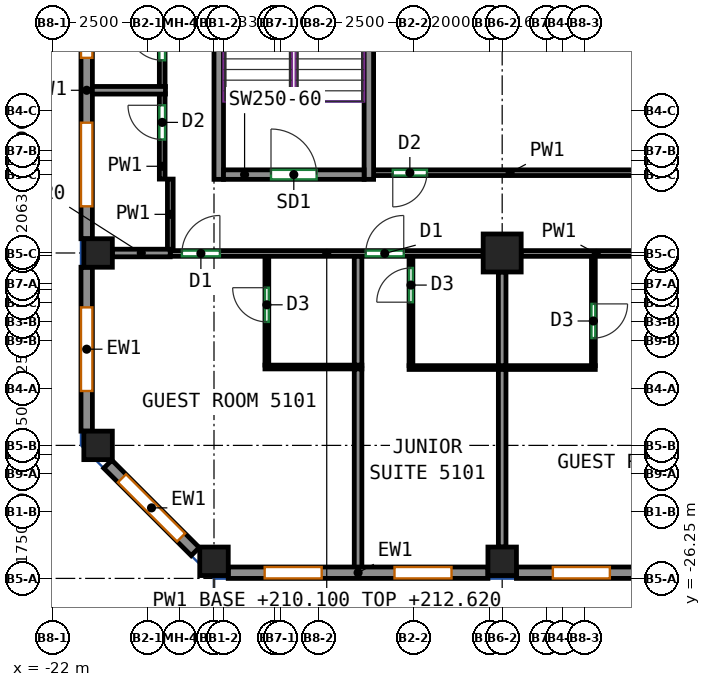
"""IFC4 building model, lengths in metres.
Left out: names, types, materials, properties, quantities, classifications, styles, units other than length and angle.
Written with IfcOpenShell. Run it as: python <this file> out.ifc"""

import sys

from ifc_helpers import new_model, si_unit, direction, frame, frame_2d, origin, origin_2d, place, context, subcontext, project, spatial, rectangle, extrude, source, transform, mapped, element, fill, save


model = new_model("IFC4")
c1 = context("Model", 3, precision=1e-05, world=origin(), true_north=direction((0.0, 1.0)))
c2 = subcontext(c1, "Body", "Model", "MODEL_VIEW")
j1 = project(units=[si_unit("LENGTHUNIT", "METRE"), si_unit("PLANEANGLEUNIT", "RADIAN")], contexts=[c1])
p1 = place(None, origin())
s1 = spatial("IfcSite", under=j1, at=p1, CompositionType="ELEMENT")
p2 = place(p1, origin())
s2 = spatial("IfcBuilding", under=s1, at=p2, CompositionType="ELEMENT")
p3 = place(p2, frame((0.0, 0.0, 210.1)))
s3 = spatial("IfcBuildingStorey", under=s2, at=p3, CompositionType="ELEMENT", Elevation=210.1)
m1 = source(origin(), c2, "Body", "SweptSolid", [
    extrude(rectangle(XDim=0.75, YDim=0.75, at=origin_2d()), origin(), (0.0, 0.0, 1.0), 3.12),
])
for number, where, z_axis, x_axis in (
    (1, (-20.8, -22.75, 0.0), (0.0, 0.0, 1.0), (1.0, 0.0, 0.0)),
    (2, (-20.8, -17.688, 0.0), (0.0, 0.0, 1.0), (1.0, 0.0, 0.0)),
    (3, (-17.75, -25.8, 0.0), (0.0, 0.0, 1.0), (1.0, 0.0, 0.0)),
    (4, (-10.167, -25.8, 0.0), (0.0, 0.0, 1.0), (1.0, 0.0, 0.0)),
):
    element("IfcColumn", number, at=place(p3, frame(where, z_axis=z_axis, x_axis=x_axis)), inside=s3, PredefinedType="COLUMN", context=c2, shape_type="MappedRepresentation", body=[
        mapped(m1, transform((0.0, 0.0, 0.0))),
    ])
m2 = source(origin(), c2, "Body", "SweptSolid", [
    extrude(rectangle(XDim=1.0, YDim=1.0, at=origin_2d()), origin(), (0.0, 0.0, 1.0), 3.12),
])
p4 = place(p3, frame((-10.167, -17.688, 0.0), z_axis=(0.0, 0.0, 1.0), x_axis=(1.0, 0.0, 0.0)))
e5 = element("IfcColumn", 5, at=p4, inside=s3, PredefinedType="COLUMN", context=c2, shape_type="MappedRepresentation", body=[
    mapped(m2, transform((0.0, 0.0, 0.0))),
])
m3 = source(origin(), c2, "Body", "SweptSolid", [
    extrude(rectangle(XDim=8.0, YDim=0.25, at=frame_2d((4.0, 0.0))), origin(), (0.0, 0.0, 1.0), 3.12),
])
for number, where, z_axis, x_axis in (
    (6, (-17.625, -15.75, 0.0), (0.0, 0.0, 1.0), (0.0, 1.0, 0.0)),
    (7, (-13.675, -15.75, 0.0), (0.0, 0.0, 1.0), (0.0, 1.0, 0.0)),
):
    element("IfcWall", number, at=place(p3, frame(where, z_axis=z_axis, x_axis=x_axis)), inside=s3, PredefinedType="SHEAR", context=c2, shape_type="MappedRepresentation", body=[
        mapped(m3, transform((0.0, 0.0, 0.0))),
    ])
m4 = source(origin(), c2, "Body", "SweptSolid", [
    extrude(rectangle(XDim=3.7, YDim=0.25, at=frame_2d((1.85, 0.0))), origin(), (0.0, 0.0, 1.0), 3.12),
])
p5 = place(p3, frame((-17.5, -15.625, 0.0), z_axis=(0.0, 0.0, 1.0), x_axis=(1.0, 0.0, 0.0)))
e8 = element("IfcWall", 8, at=p5, inside=s3, PredefinedType="SHEAR", context=c2, shape_type="MappedRepresentation", body=[
    mapped(m4, transform((0.0, 0.0, 0.0))),
])
p6 = place(p5, frame((1.25, 0.0, 0.0)))
e9 = element("IfcOpeningElement", 9, at=p6, cuts=e8, PredefinedType="OPENING", context=c2, shape_type="SweptSolid", body=[
    extrude(rectangle(XDim=1.2, YDim=2.1, at=frame_2d((0.6, 1.05))), frame((0.0, 0.135, 0.0), z_axis=(0.0, -1.0, 0.0), x_axis=(1.0, 0.0, 0.0)), (0.0, 0.0, 1.0), 0.27),
])
m5 = source(origin(), c2, "Body", "SweptSolid", [
    extrude(rectangle(XDim=6.833, YDim=0.3, at=frame_2d((3.417, 0.0))), origin(), (0.0, 0.0, 1.0), 3.12),
])
p7 = place(p3, frame((-17.375, -26.1, 0.0), z_axis=(0.0, 0.0, 1.0), x_axis=(1.0, 0.0, 0.0)))
e10 = element("IfcWall", 10, at=p7, inside=s3, PredefinedType="SOLIDWALL", context=c2, shape_type="MappedRepresentation", body=[
    mapped(m5, transform((0.0, 0.0, 0.0))),
])
p8 = place(p7, frame((0.958, 0.0, 0.85)))
e11 = element("IfcOpeningElement", 11, at=p8, cuts=e10, PredefinedType="OPENING", context=c2, shape_type="SweptSolid", body=[
    extrude(rectangle(XDim=1.5, YDim=1.95, at=frame_2d((0.75, 0.975))), frame((0.0, 0.16, 0.0), z_axis=(0.0, -1.0, 0.0), x_axis=(1.0, 0.0, 0.0)), (0.0, 0.0, 1.0), 0.32),
])
p9 = place(p7, frame((4.375, 0.0, 0.85)))
e12 = element("IfcOpeningElement", 12, at=p9, cuts=e10, PredefinedType="OPENING", context=c2, shape_type="SweptSolid", body=[
    extrude(rectangle(XDim=1.5, YDim=1.95, at=frame_2d((0.75, 0.975))), frame((0.0, 0.16, 0.0), z_axis=(0.0, -1.0, 0.0), x_axis=(1.0, 0.0, 0.0)), (0.0, 0.0, 1.0), 0.32),
])
m6 = source(origin(), c2, "Body", "SweptSolid", [
    extrude(rectangle(XDim=6.833, YDim=0.3, at=frame_2d((3.417, 0.0))), origin(), (0.0, 0.0, 1.0), 3.12),
])
p10 = place(p3, frame((-9.792, -26.1, 0.0), z_axis=(0.0, 0.0, 1.0), x_axis=(1.0, 0.0, 0.0)))
e13 = element("IfcWall", 13, at=p10, inside=s3, PredefinedType="SOLIDWALL", context=c2, shape_type="MappedRepresentation", body=[
    mapped(m6, transform((0.0, 0.0, 0.0))),
])
p11 = place(p10, frame((0.958, 0.0, 0.85)))
e14 = element("IfcOpeningElement", 14, at=p11, cuts=e13, PredefinedType="OPENING", context=c2, shape_type="SweptSolid", body=[
    extrude(rectangle(XDim=1.5, YDim=1.95, at=frame_2d((0.75, 0.975))), frame((0.0, 0.16, 0.0), z_axis=(0.0, -1.0, 0.0), x_axis=(1.0, 0.0, 0.0)), (0.0, 0.0, 1.0), 0.32),
])
p12 = place(p10, frame((4.375, 0.0, 0.85)))
e15 = element("IfcOpeningElement", 15, at=p12, cuts=e13, PredefinedType="OPENING", context=c2, shape_type="SweptSolid", body=[
    extrude(rectangle(XDim=1.5, YDim=1.95, at=frame_2d((0.75, 0.975))), frame((0.0, 0.16, 0.0), z_axis=(0.0, -1.0, 0.0), x_axis=(1.0, 0.0, 0.0)), (0.0, 0.0, 1.0), 0.32),
])
m7 = source(origin(), c2, "Body", "SweptSolid", [
    extrude(rectangle(XDim=7.812, YDim=0.3, at=frame_2d((3.906, 0.0))), origin(), (0.0, 0.0, 1.0), 3.12),
])
p13 = place(p3, frame((-21.1, -9.5, 0.0), z_axis=(0.0, 0.0, 1.0), x_axis=(0.0, -1.0, 0.0)))
e16 = element("IfcWall", 16, at=p13, inside=s3, PredefinedType="SOLIDWALL", context=c2, shape_type="MappedRepresentation", body=[
    mapped(m7, transform((0.0, 0.0, 0.0))),
])
p14 = place(p13, frame((0.853, 0.0, 0.85)))
e17 = element("IfcOpeningElement", 17, at=p14, cuts=e16, PredefinedType="OPENING", context=c2, shape_type="SweptSolid", body=[
    extrude(rectangle(XDim=2.2, YDim=1.95, at=frame_2d((1.1, 0.975))), frame((0.0, 0.16, 0.0), z_axis=(0.0, -1.0, 0.0), x_axis=(1.0, 0.0, 0.0)), (0.0, 0.0, 1.0), 0.32),
])
p15 = place(p13, frame((4.759, 0.0, 0.85)))
e18 = element("IfcOpeningElement", 18, at=p15, cuts=e16, PredefinedType="OPENING", context=c2, shape_type="SweptSolid", body=[
    extrude(rectangle(XDim=2.2, YDim=1.95, at=frame_2d((1.1, 0.975))), frame((0.0, 0.16, 0.0), z_axis=(0.0, -1.0, 0.0), x_axis=(1.0, 0.0, 0.0)), (0.0, 0.0, 1.0), 0.32),
])
m8 = source(origin(), c2, "Body", "SweptSolid", [
    extrude(rectangle(XDim=4.312, YDim=0.3, at=frame_2d((2.156, 0.0))), origin(), (0.0, 0.0, 1.0), 3.12),
])
p16 = place(p3, frame((-21.1, -18.062, 0.0), z_axis=(0.0, 0.0, 1.0), x_axis=(0.0, -1.0, 0.0)))
e19 = element("IfcWall", 19, at=p16, inside=s3, PredefinedType="SOLIDWALL", context=c2, shape_type="MappedRepresentation", body=[
    mapped(m8, transform((0.0, 0.0, 0.0))),
])
p17 = place(p16, frame((1.056, 0.0, 0.85)))
e20 = element("IfcOpeningElement", 20, at=p17, cuts=e19, PredefinedType="OPENING", context=c2, shape_type="SweptSolid", body=[
    extrude(rectangle(XDim=2.2, YDim=1.95, at=frame_2d((1.1, 0.975))), frame((0.0, 0.16, 0.0), z_axis=(0.0, -1.0, 0.0), x_axis=(1.0, 0.0, 0.0)), (0.0, 0.0, 1.0), 0.32),
])
m9 = source(origin(), c2, "Body", "SweptSolid", [
    extrude(rectangle(XDim=3.253, YDim=0.3, at=frame_2d((1.626, 0.0))), origin(), (0.0, 0.0, 1.0), 3.12),
])
p18 = place(p3, frame((-20.544, -23.244, 0.0), z_axis=(0.0, 0.0, 1.0), x_axis=(0.707106781187, -0.707106781187, 0.0)))
e21 = element("IfcWall", 21, at=p18, inside=s3, PredefinedType="SOLIDWALL", context=c2, shape_type="MappedRepresentation", body=[
    mapped(m9, transform((0.0, 0.0, 0.0))),
])
p19 = place(p18, frame((0.526, 0.0, 0.85)))
e22 = element("IfcOpeningElement", 22, at=p19, cuts=e21, PredefinedType="OPENING", context=c2, shape_type="SweptSolid", body=[
    extrude(rectangle(XDim=2.2, YDim=1.95, at=frame_2d((1.1, 0.975))), frame((0.0, 0.16, 0.0), z_axis=(0.0, -1.0, 0.0), x_axis=(1.0, 0.0, 0.0)), (0.0, 0.0, 1.0), 0.32),
])
p20 = place(p3, frame((-18.9, -17.7, 0.0), z_axis=(0.0, 0.0, 1.0), x_axis=(1.0, 0.0, 0.0)))
e23 = element("IfcWall", 23, at=p20, inside=s3, PredefinedType="PARTITIONING", context=c2, shape_type="SweptSolid", body=[
    extrude(rectangle(XDim=8.233, YDim=0.15, at=frame_2d((4.116, 0.0))), origin(), (0.0, 0.0, 1.0), 2.52),
])
p21 = place(p20, frame((0.305, 0.0, 0.0)))
e24 = element("IfcOpeningElement", 24, at=p21, cuts=e23, PredefinedType="OPENING", context=c2, shape_type="SweptSolid", body=[
    extrude(rectangle(XDim=1.0, YDim=2.1, at=frame_2d((0.5, 1.05))), frame((0.0, 0.085, 0.0), z_axis=(0.0, -1.0, 0.0), x_axis=(1.0, 0.0, 0.0)), (0.0, 0.0, 1.0), 0.17),
])
p22 = place(p20, frame((5.143, 0.0, 0.0)))
e25 = element("IfcOpeningElement", 25, at=p22, cuts=e23, PredefinedType="OPENING", context=c2, shape_type="SweptSolid", body=[
    extrude(rectangle(XDim=1.0, YDim=2.1, at=frame_2d((0.5, 1.05))), frame((0.0, 0.085, 0.0), z_axis=(0.0, -1.0, 0.0), x_axis=(1.0, 0.0, 0.0)), (0.0, 0.0, 1.0), 0.17),
])
p23 = place(p3, frame((-9.667, -17.7, 0.0), z_axis=(0.0, 0.0, 1.0), x_axis=(1.0, 0.0, 0.0)))
e26 = element("IfcWall", 26, at=p23, inside=s3, PredefinedType="PARTITIONING", context=c2, shape_type="SweptSolid", body=[
    extrude(rectangle(XDim=6.584, YDim=0.15, at=frame_2d((3.292, 0.0))), origin(), (0.0, 0.0, 1.0), 3.12),
])
p24 = place(p23, frame((3.119, 0.0, 0.0)))
e27 = element("IfcOpeningElement", 27, at=p24, cuts=e26, PredefinedType="OPENING", context=c2, shape_type="SweptSolid", body=[
    extrude(rectangle(XDim=1.0, YDim=2.1, at=frame_2d((0.5, 1.05))), frame((0.0, 0.085, 0.0), z_axis=(0.0, -1.0, 0.0), x_axis=(1.0, 0.0, 0.0)), (0.0, 0.0, 1.0), 0.17),
])
p25 = place(p3, frame((-18.9, -17.598, 0.0), z_axis=(0.0, 0.0, 1.0), x_axis=(0.0, 1.0, 0.0)))
e28 = element("IfcWall", 28, at=p25, inside=s3, PredefinedType="PARTITIONING", context=c2, shape_type="SweptSolid", body=[
    extrude(rectangle(XDim=1.855, YDim=0.15, at=frame_2d((0.927, 0.0))), origin(), (0.0, 0.0, 1.0), 3.12),
])
p26 = place(p3, frame((-19.113, -15.743, 0.0), z_axis=(0.0, 0.0, 1.0), x_axis=(0.0, 1.0, 0.0)))
e29 = element("IfcWall", 29, at=p26, inside=s3, PredefinedType="PARTITIONING", context=c2, shape_type="SweptSolid", body=[
    extrude(rectangle(XDim=2.247, YDim=0.15, at=frame_2d((1.124, 0.0))), origin(), (0.0, 0.0, 1.0), 3.12),
])
p27 = place(p26, frame((1.042, 0.0, 0.0)))
e30 = element("IfcOpeningElement", 30, at=p27, cuts=e29, PredefinedType="OPENING", context=c2, shape_type="SweptSolid", body=[
    extrude(rectangle(XDim=0.9, YDim=2.1, at=frame_2d((0.45, 1.05))), frame((0.0, 0.085, 0.0), z_axis=(0.0, -1.0, 0.0), x_axis=(1.0, 0.0, 0.0)), (0.0, 0.0, 1.0), 0.17),
])
p28 = place(p3, frame((-19.113, -13.316, 0.0), z_axis=(0.0, 0.0, 1.0), x_axis=(0.0, 1.0, 0.0)))
e31 = element("IfcWall", 31, at=p28, inside=s3, PredefinedType="PARTITIONING", context=c2, shape_type="SweptSolid", body=[
    extrude(rectangle(XDim=4.101, YDim=0.15, at=frame_2d((2.05, 0.0))), origin(), (0.0, 0.0, 1.0), 3.12),
])
p29 = place(p28, frame((0.7, 0.0, 0.0)))
e32 = element("IfcOpeningElement", 32, at=p29, cuts=e31, PredefinedType="OPENING", context=c2, shape_type="SweptSolid", body=[
    extrude(rectangle(XDim=0.9, YDim=2.1, at=frame_2d((0.45, 1.05))), frame((0.0, 0.085, 0.0), z_axis=(0.0, -1.0, 0.0), x_axis=(1.0, 0.0, 0.0)), (0.0, 0.0, 1.0), 0.17),
])
p30 = place(p3, frame((-6.365, -15.575, 0.0), z_axis=(0.0, 0.0, 1.0), x_axis=(-1.0, 0.0, 0.0)))
e33 = element("IfcWall", 33, at=p30, inside=s3, PredefinedType="PARTITIONING", context=c2, shape_type="SweptSolid", body=[
    extrude(rectangle(XDim=7.185, YDim=0.15, at=frame_2d((3.593, 0.0))), origin(), (0.0, 0.0, 1.0), 3.12),
])
p31 = place(p30, frame((5.781, 0.0, 0.0)))
e34 = element("IfcOpeningElement", 34, at=p31, cuts=e33, PredefinedType="OPENING", context=c2, shape_type="SweptSolid", body=[
    extrude(rectangle(XDim=0.9, YDim=2.1, at=frame_2d((0.45, 1.05))), frame((0.0, 0.085, 0.0), z_axis=(0.0, -1.0, 0.0), x_axis=(1.0, 0.0, 0.0)), (0.0, 0.0, 1.0), 0.17),
])
p32 = place(p3, frame((-16.359, -20.638, 0.0), z_axis=(0.0, 0.0, 1.0), x_axis=(0.0, 1.0, 0.0)))
e35 = element("IfcWall", 35, at=p32, inside=s3, PredefinedType="PARTITIONING", context=c2, shape_type="SweptSolid", body=[
    extrude(rectangle(XDim=2.861, YDim=0.1, at=frame_2d((1.43, 0.0))), origin(), (0.0, 0.0, 1.0), 3.12),
])
p33 = place(p32, frame((1.137, 0.0, 0.0)))
e36 = element("IfcOpeningElement", 36, at=p33, cuts=e35, PredefinedType="OPENING", context=c2, shape_type="SweptSolid", body=[
    extrude(rectangle(XDim=0.9, YDim=2.1, at=frame_2d((0.45, 1.05))), frame((0.0, 0.06, 0.0), z_axis=(0.0, -1.0, 0.0), x_axis=(1.0, 0.0, 0.0)), (0.0, 0.0, 1.0), 0.12),
])
p34 = place(p3, frame((-16.409, -20.688, 0.0), z_axis=(0.0, 0.0, 1.0), x_axis=(1.0, 0.0, 0.0)))
e37 = element("IfcWall", 37, at=p34, inside=s3, PredefinedType="PARTITIONING", context=c2, shape_type="SweptSolid", body=[
    extrude(rectangle(XDim=2.55, YDim=0.1, at=frame_2d((1.275, 0.0))), origin(), (0.0, 0.0, 1.0), 3.12),
])
p35 = place(p3, frame((-13.959, -26.0, 0.0), z_axis=(0.0, 0.0, 1.0), x_axis=(0.0, 1.0, 0.0)))
e38 = element("IfcWall", 38, at=p35, inside=s3, PredefinedType="PARTITIONING", context=c2, shape_type="SweptSolid", body=[
    extrude(rectangle(XDim=5.262, YDim=0.2, at=frame_2d((2.631, 0.0))), origin(), (0.0, 0.0, 1.0), 3.12),
])
p36 = place(p3, frame((-20.425, -17.688, 0.0), z_axis=(0.0, 0.0, 1.0), x_axis=(1.0, 0.0, 0.0)))
e39 = element("IfcWall", 39, at=p36, inside=s3, PredefinedType="PARTITIONING", context=c2, shape_type="SweptSolid", body=[
    extrude(rectangle(XDim=1.523, YDim=0.2, at=frame_2d((0.761, 0.0))), origin(), (0.0, 0.0, 1.0), 2.52),
])
p37 = place(p3, frame((-13.959, -20.638, 0.0), z_axis=(0.0, 0.0, 1.0), x_axis=(0.0, 1.0, 0.0)))
e40 = element("IfcWall", 40, at=p37, inside=s3, PredefinedType="PARTITIONING", context=c2, shape_type="SweptSolid", body=[
    extrude(rectangle(XDim=2.861, YDim=0.2, at=frame_2d((1.43, 0.0))), origin(), (0.0, 0.0, 1.0), 3.12),
])
p38 = place(p3, frame((-12.567, -20.652, 0.0), z_axis=(0.0, 0.0, 1.0), x_axis=(0.0, 1.0, 0.0)))
e41 = element("IfcWall", 41, at=p38, inside=s3, PredefinedType="PARTITIONING", context=c2, shape_type="SweptSolid", body=[
    extrude(rectangle(XDim=2.875, YDim=0.1, at=frame_2d((1.438, 0.0))), origin(), (0.0, 0.0, 1.0), 3.12),
])
p39 = place(p38, frame((1.67, 0.0, 0.0)))
e42 = element("IfcOpeningElement", 42, at=p39, cuts=e41, PredefinedType="OPENING", context=c2, shape_type="SweptSolid", body=[
    extrude(rectangle(XDim=0.9, YDim=2.1, at=frame_2d((0.45, 1.05))), frame((0.0, 0.06, 0.0), z_axis=(0.0, -1.0, 0.0), x_axis=(1.0, 0.0, 0.0)), (0.0, 0.0, 1.0), 0.12),
])
p40 = place(p3, frame((-12.617, -20.702, 0.0), z_axis=(0.0, 0.0, 1.0), x_axis=(1.0, 0.0, 0.0)))
e43 = element("IfcWall", 43, at=p40, inside=s3, PredefinedType="PARTITIONING", context=c2, shape_type="SweptSolid", body=[
    extrude(rectangle(XDim=4.9, YDim=0.1, at=frame_2d((2.45, 0.0))), origin(), (0.0, 0.0, 1.0), 3.12),
])
p41 = place(p3, frame((-10.167, -25.425, 0.0), z_axis=(0.0, 0.0, 1.0), x_axis=(0.0, 1.0, 0.0)))
e44 = element("IfcWall", 44, at=p41, inside=s3, PredefinedType="PARTITIONING", context=c2, shape_type="SweptSolid", body=[
    extrude(rectangle(XDim=4.673, YDim=0.2, at=frame_2d((2.336, 0.0))), origin(), (0.0, 0.0, 1.0), 3.12),
])
p42 = place(p3, frame((-10.167, -20.652, 0.0), z_axis=(0.0, 0.0, 1.0), x_axis=(0.0, 1.0, 0.0)))
e45 = element("IfcWall", 45, at=p42, inside=s3, PredefinedType="PARTITIONING", context=c2, shape_type="SweptSolid", body=[
    extrude(rectangle(XDim=2.464, YDim=0.2, at=frame_2d((1.232, 0.0))), origin(), (0.0, 0.0, 1.0), 3.12),
])
p43 = place(p3, frame((-7.767, -17.777, 0.0), z_axis=(0.0, 0.0, 1.0), x_axis=(0.0, -1.0, 0.0)))
e46 = element("IfcWall", 46, at=p43, inside=s3, PredefinedType="PARTITIONING", context=c2, shape_type="SweptSolid", body=[
    extrude(rectangle(XDim=2.875, YDim=0.1, at=frame_2d((1.438, 0.0))), origin(), (0.0, 0.0, 1.0), 3.12),
])
p44 = place(p43, frame((1.25, 0.0, 0.0)))
e47 = element("IfcOpeningElement", 47, at=p44, cuts=e46, PredefinedType="OPENING", context=c2, shape_type="SweptSolid", body=[
    extrude(rectangle(XDim=0.9, YDim=2.1, at=frame_2d((0.45, 1.05))), frame((0.0, 0.06, 0.0), z_axis=(0.0, -1.0, 0.0), x_axis=(1.0, 0.0, 0.0)), (0.0, 0.0, 1.0), 0.12),
])
p45 = place(p3, frame((-19.027, -13.406, 0.0), z_axis=(0.0, 0.0, 1.0), x_axis=(-1.0, 0.0, 0.0)))
e48 = element("IfcWall", 48, at=p45, inside=s3, PredefinedType="PARTITIONING", context=c2, shape_type="SweptSolid", body=[
    extrude(rectangle(XDim=1.973, YDim=0.2, at=frame_2d((0.986, 0.0))), origin(), (0.0, 0.0, 1.0), 3.12),
])
p46 = place(p8, origin())
e49 = element("IfcWindow", 49, at=p46, inside=s3, PartitioningType="SINGLE_PANEL", PredefinedType="WINDOW", context=c2, shape_type="SweptSolid", body=[
    extrude(rectangle(XDim=1.5, YDim=1.95, at=frame_2d((0.75, 0.975))), frame((0.0, 0.03, 0.0), z_axis=(0.0, -1.0, 0.0), x_axis=(1.0, 0.0, 0.0)), (0.0, 0.0, 1.0), 0.06),
])
fill(e11, e49)
p47 = place(p9, origin())
e50 = element("IfcWindow", 50, at=p47, inside=s3, PartitioningType="SINGLE_PANEL", PredefinedType="WINDOW", context=c2, shape_type="SweptSolid", body=[
    extrude(rectangle(XDim=1.5, YDim=1.95, at=frame_2d((0.75, 0.975))), frame((0.0, 0.03, 0.0), z_axis=(0.0, -1.0, 0.0), x_axis=(1.0, 0.0, 0.0)), (0.0, 0.0, 1.0), 0.06),
])
fill(e12, e50)
p48 = place(p11, origin())
e51 = element("IfcWindow", 51, at=p48, inside=s3, PartitioningType="SINGLE_PANEL", PredefinedType="WINDOW", context=c2, shape_type="SweptSolid", body=[
    extrude(rectangle(XDim=1.5, YDim=1.95, at=frame_2d((0.75, 0.975))), frame((0.0, 0.03, 0.0), z_axis=(0.0, -1.0, 0.0), x_axis=(1.0, 0.0, 0.0)), (0.0, 0.0, 1.0), 0.06),
])
fill(e14, e51)
p49 = place(p14, origin())
e52 = element("IfcWindow", 52, at=p49, inside=s3, PartitioningType="SINGLE_PANEL", PredefinedType="WINDOW", context=c2, shape_type="SweptSolid", body=[
    extrude(rectangle(XDim=2.2, YDim=1.95, at=frame_2d((1.1, 0.975))), frame((0.0, 0.03, 0.0), z_axis=(0.0, -1.0, 0.0), x_axis=(1.0, 0.0, 0.0)), (0.0, 0.0, 1.0), 0.06),
])
fill(e17, e52)
p50 = place(p15, origin())
e53 = element("IfcWindow", 53, at=p50, inside=s3, PartitioningType="SINGLE_PANEL", PredefinedType="WINDOW", context=c2, shape_type="SweptSolid", body=[
    extrude(rectangle(XDim=2.2, YDim=1.95, at=frame_2d((1.1, 0.975))), frame((0.0, 0.03, 0.0), z_axis=(0.0, -1.0, 0.0), x_axis=(1.0, 0.0, 0.0)), (0.0, 0.0, 1.0), 0.06),
])
fill(e18, e53)
p51 = place(p17, origin())
e54 = element("IfcWindow", 54, at=p51, inside=s3, PartitioningType="SINGLE_PANEL", PredefinedType="WINDOW", context=c2, shape_type="SweptSolid", body=[
    extrude(rectangle(XDim=2.2, YDim=1.95, at=frame_2d((1.1, 0.975))), frame((0.0, 0.03, 0.0), z_axis=(0.0, -1.0, 0.0), x_axis=(1.0, 0.0, 0.0)), (0.0, 0.0, 1.0), 0.06),
])
fill(e20, e54)
p52 = place(p19, origin())
e55 = element("IfcWindow", 55, at=p52, inside=s3, PartitioningType="SINGLE_PANEL", PredefinedType="WINDOW", context=c2, shape_type="SweptSolid", body=[
    extrude(rectangle(XDim=2.2, YDim=1.95, at=frame_2d((1.1, 0.975))), frame((0.0, 0.03, 0.0), z_axis=(0.0, -1.0, 0.0), x_axis=(1.0, 0.0, 0.0)), (0.0, 0.0, 1.0), 0.06),
])
fill(e22, e55)
p53 = place(p6, origin())
e56 = element("IfcDoor", 56, at=p53, inside=s3, OperationType="DOUBLE_DOOR_SINGLE_SWING", PredefinedType="DOOR", context=c2, shape_type="SweptSolid", body=[
    extrude(rectangle(XDim=1.2, YDim=2.1, at=frame_2d((0.6, 1.05))), frame((0.0, 0.025, 0.0), z_axis=(0.0, -1.0, 0.0), x_axis=(1.0, 0.0, 0.0)), (0.0, 0.0, 1.0), 0.05),
])
fill(e9, e56)
p54 = place(p44, origin())
e57 = element("IfcDoor", 57, at=p54, inside=s3, OperationType="SINGLE_SWING_LEFT", PredefinedType="DOOR", context=c2, shape_type="SweptSolid", body=[
    extrude(rectangle(XDim=0.9, YDim=2.1, at=frame_2d((0.45, 1.05))), frame((0.0, 0.025, 0.0), z_axis=(0.0, -1.0, 0.0), x_axis=(1.0, 0.0, 0.0)), (0.0, 0.0, 1.0), 0.05),
])
fill(e47, e57)
p55 = place(p33, origin())
e58 = element("IfcDoor", 58, at=p55, inside=s3, OperationType="SINGLE_SWING_RIGHT", PredefinedType="DOOR", context=c2, shape_type="SweptSolid", body=[
    extrude(rectangle(XDim=0.9, YDim=2.1, at=frame_2d((0.45, 1.05))), frame((0.0, 0.025, 0.0), z_axis=(0.0, -1.0, 0.0), x_axis=(1.0, 0.0, 0.0)), (0.0, 0.0, 1.0), 0.05),
])
fill(e36, e58)
p56 = place(p39, origin())
e59 = element("IfcDoor", 59, at=p56, inside=s3, OperationType="SINGLE_SWING_LEFT", PredefinedType="DOOR", context=c2, shape_type="SweptSolid", body=[
    extrude(rectangle(XDim=0.9, YDim=2.1, at=frame_2d((0.45, 1.05))), frame((0.0, 0.025, 0.0), z_axis=(0.0, -1.0, 0.0), x_axis=(1.0, 0.0, 0.0)), (0.0, 0.0, 1.0), 0.05),
])
fill(e42, e59)
p57 = place(p21, origin())
e60 = element("IfcDoor", 60, at=p57, inside=s3, OperationType="SINGLE_SWING_RIGHT", PredefinedType="DOOR", context=c2, shape_type="SweptSolid", body=[
    extrude(rectangle(XDim=1.0, YDim=2.1, at=frame_2d((0.5, 1.05))), frame((0.0, 0.025, 0.0), z_axis=(0.0, -1.0, 0.0), x_axis=(1.0, 0.0, 0.0)), (0.0, 0.0, 1.0), 0.05),
])
fill(e24, e60)
p58 = place(p22, origin())
e61 = element("IfcDoor", 61, at=p58, inside=s3, OperationType="SINGLE_SWING_RIGHT", PredefinedType="DOOR", context=c2, shape_type="SweptSolid", body=[
    extrude(rectangle(XDim=1.0, YDim=2.1, at=frame_2d((0.5, 1.05))), frame((0.0, 0.025, 0.0), z_axis=(0.0, -1.0, 0.0), x_axis=(1.0, 0.0, 0.0)), (0.0, 0.0, 1.0), 0.05),
])
fill(e25, e61)
p59 = place(p31, origin())
e62 = element("IfcDoor", 62, at=p59, inside=s3, OperationType="SINGLE_SWING_RIGHT", PredefinedType="DOOR", context=c2, shape_type="SweptSolid", body=[
    extrude(rectangle(XDim=0.9, YDim=2.1, at=frame_2d((0.45, 1.05))), frame((0.0, 0.025, 0.0), z_axis=(0.0, -1.0, 0.0), x_axis=(1.0, 0.0, 0.0)), (0.0, 0.0, 1.0), 0.05),
])
fill(e34, e62)
p60 = place(p27, origin())
e63 = element("IfcDoor", 63, at=p60, inside=s3, OperationType="SINGLE_SWING_RIGHT", PredefinedType="DOOR", context=c2, shape_type="SweptSolid", body=[
    extrude(rectangle(XDim=0.9, YDim=2.1, at=frame_2d((0.45, 1.05))), frame((0.0, 0.025, 0.0), z_axis=(0.0, -1.0, 0.0), x_axis=(1.0, 0.0, 0.0)), (0.0, 0.0, 1.0), 0.05),
])
fill(e30, e63)
p61 = place(p29, origin())
e64 = element("IfcDoor", 64, at=p61, inside=s3, OperationType="SINGLE_SWING_RIGHT", PredefinedType="DOOR", context=c2, shape_type="SweptSolid", body=[
    extrude(rectangle(XDim=0.9, YDim=2.1, at=frame_2d((0.45, 1.05))), frame((0.0, 0.025, 0.0), z_axis=(0.0, -1.0, 0.0), x_axis=(1.0, 0.0, 0.0)), (0.0, 0.0, 1.0), 0.05),
])
fill(e32, e64)
save(model, sys.argv[1])
